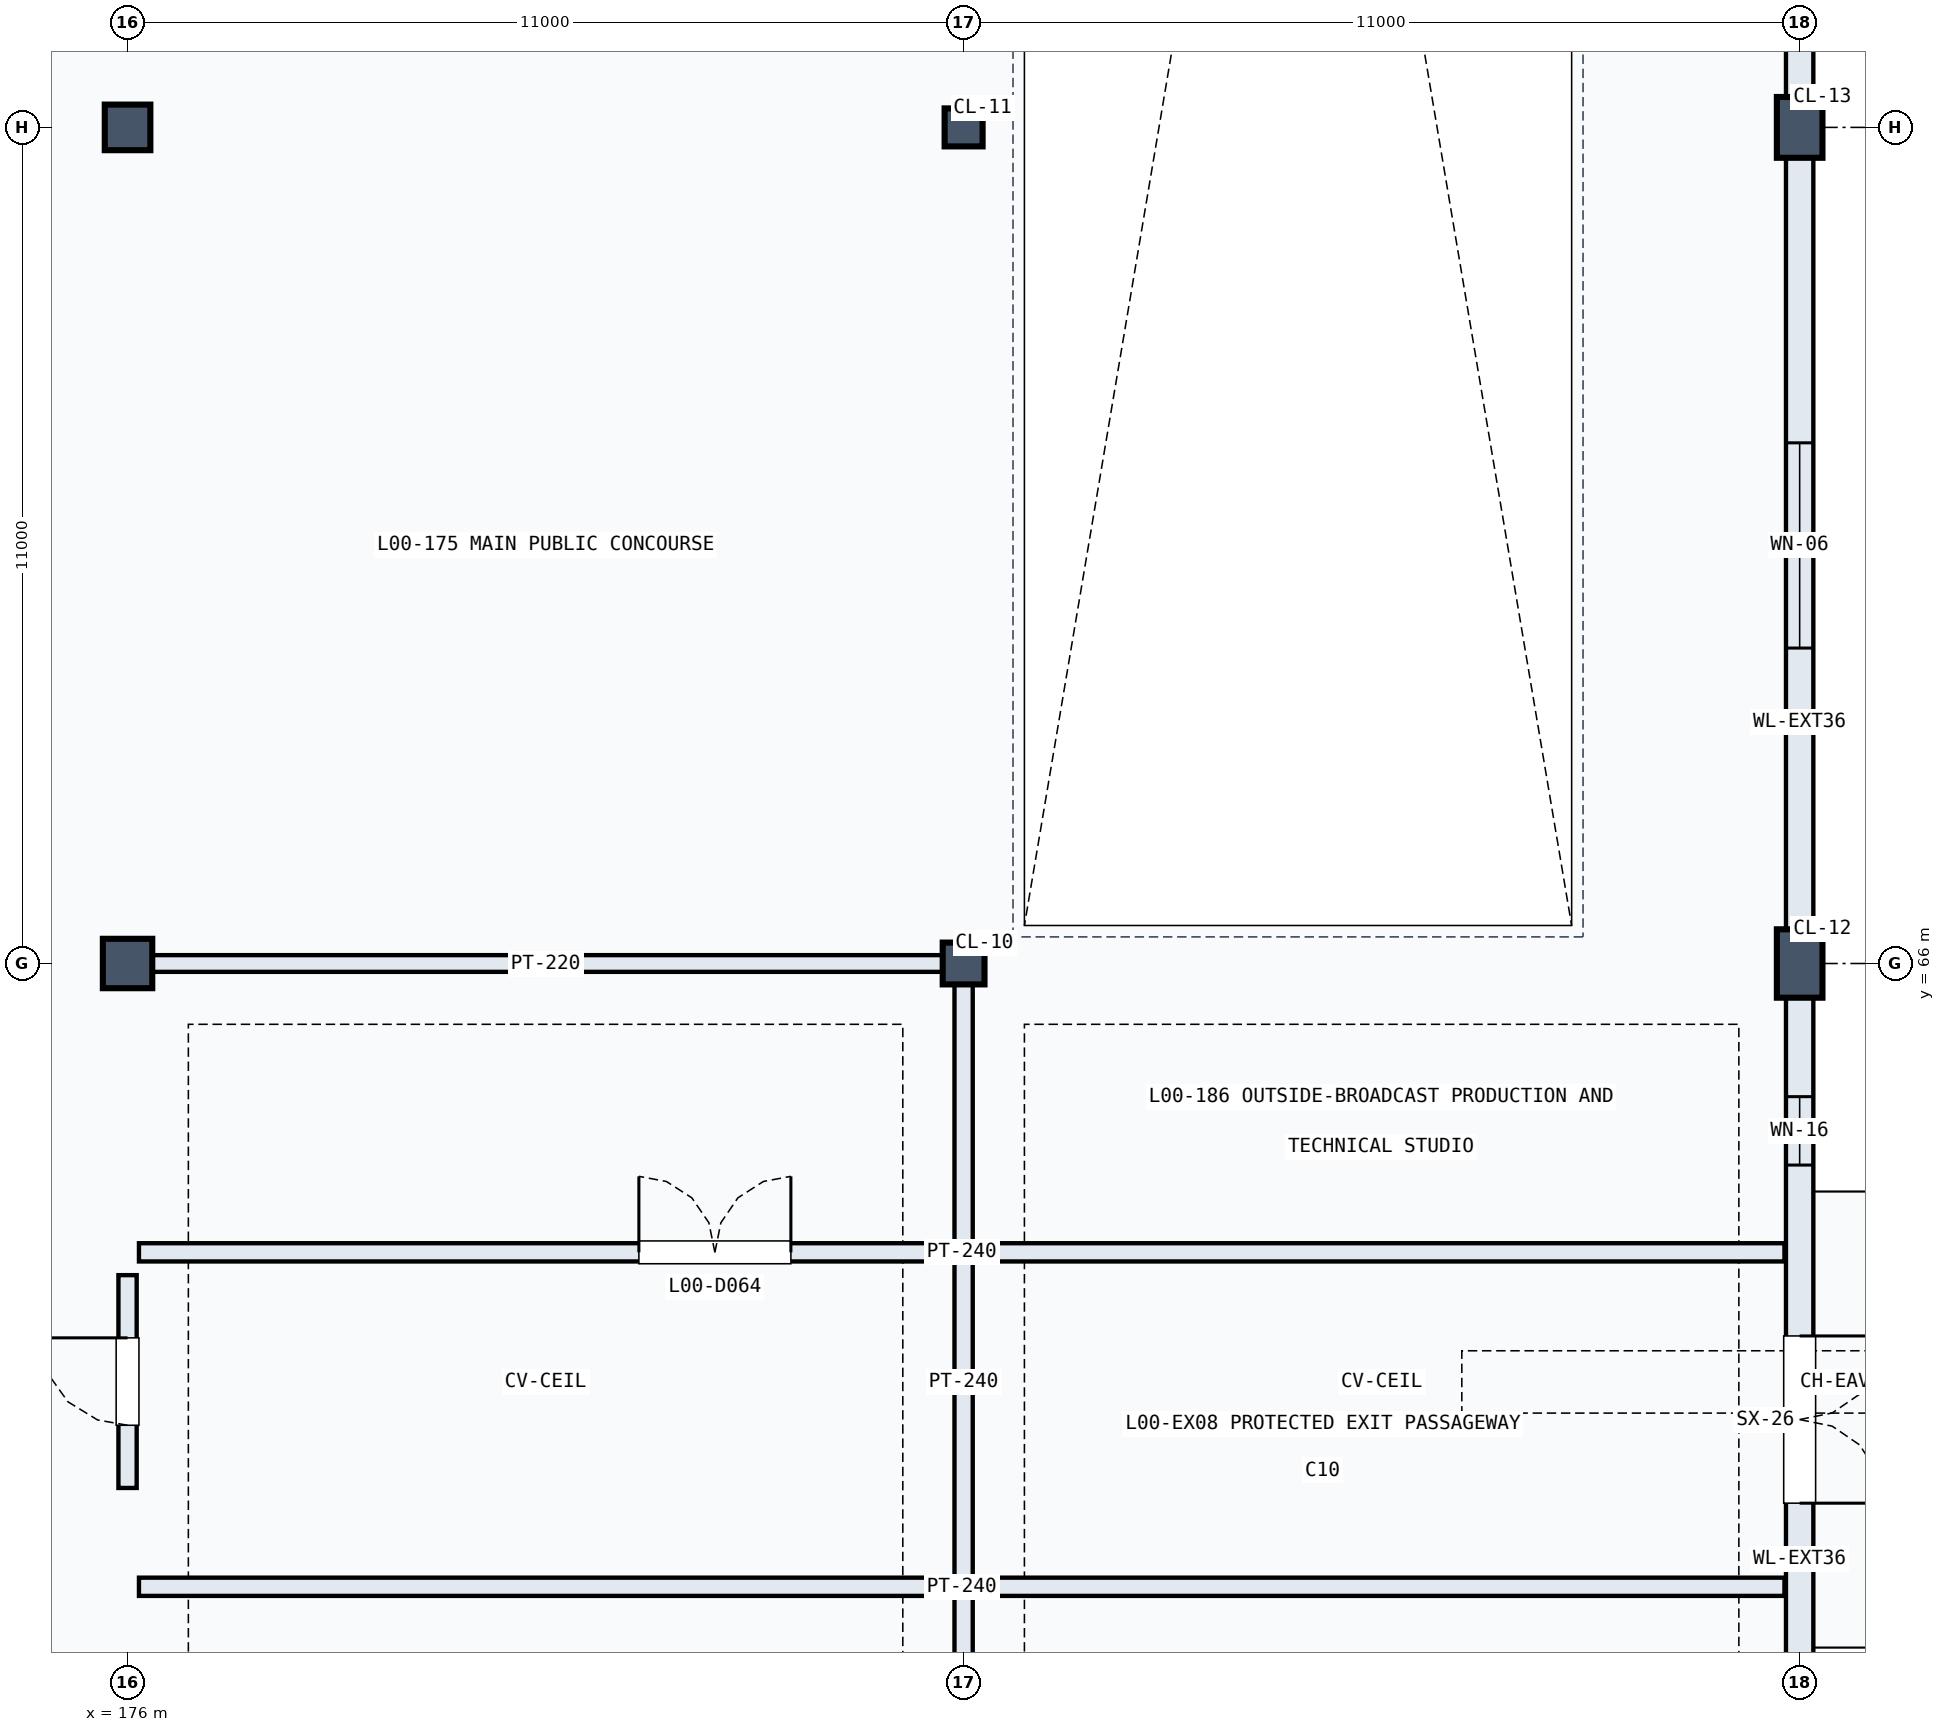
"""IFC4 building model, lengths in metres.
Left out: names, types, materials, properties, quantities, classifications, styles, units other than length and angle.
Written with IfcOpenShell. Run it as: python <this file> out.ifc"""

import sys

from ifc_helpers import new_model, si_unit, direction, frame, frame_2d, origin, origin_2d, place, context, subcontext, project, spatial, rectangle, extrude, element, fill, save


model = new_model("IFC4")
c1 = context("Model", 3, precision=1e-05, world=origin(), true_north=direction((0.0, 1.0)))
c2 = subcontext(c1, "Body", "Model", "MODEL_VIEW")
j1 = project(units=[si_unit("LENGTHUNIT", "METRE"), si_unit("PLANEANGLEUNIT", "RADIAN")], contexts=[c1])
p1 = place(None, origin())
s1 = spatial("IfcSite", under=j1, at=p1, CompositionType="ELEMENT")
p2 = place(p1, origin())
s2 = spatial("IfcBuilding", under=s1, at=p2, CompositionType="ELEMENT")
p3 = place(p2, origin())
s3 = spatial("IfcBuildingStorey", under=s2, at=p3, CompositionType="ELEMENT", Elevation=0.0)
p4 = place(p3, frame((176.0, 66.0, 0.0), z_axis=(0.0, 0.0, 1.0), x_axis=(1.0, 0.0, 0.0)))
e1 = element("IfcColumn", 1, at=p4, inside=s3, PredefinedType="COLUMN", context=c2, shape_type="SweptSolid", body=[
    extrude(rectangle(XDim=0.65, YDim=0.65, at=origin_2d()), origin(), (0.0, 0.0, 1.0), 5.4),
])
p5 = place(p3, frame((176.0, 77.0, 0.0), z_axis=(0.0, 0.0, 1.0), x_axis=(1.0, 0.0, 0.0)))
e2 = element("IfcColumn", 2, at=p5, inside=s3, PredefinedType="COLUMN", context=c2, shape_type="SweptSolid", body=[
    extrude(rectangle(XDim=0.6, YDim=0.6, at=origin_2d()), origin(), (0.0, 0.0, 1.0), 5.4),
])
p6 = place(p3, frame((187.0, 66.0, 0.0), z_axis=(0.0, 0.0, 1.0), x_axis=(1.0, 0.0, 0.0)))
e3 = element("IfcColumn", 3, at=p6, inside=s3, PredefinedType="COLUMN", context=c2, shape_type="SweptSolid", body=[
    extrude(rectangle(XDim=0.55, YDim=0.55, at=origin_2d()), origin(), (0.0, 0.0, 1.0), 5.4),
])
p7 = place(p3, frame((187.0, 77.0, 0.0), z_axis=(0.0, 0.0, 1.0), x_axis=(1.0, 0.0, 0.0)))
e4 = element("IfcColumn", 4, at=p7, inside=s3, PredefinedType="COLUMN", context=c2, shape_type="SweptSolid", body=[
    extrude(rectangle(XDim=0.5, YDim=0.5, at=origin_2d()), origin(), (0.0, 0.0, 1.0), 5.4),
])
p8 = place(p3, frame((198.0, 66.0, 0.0), z_axis=(0.0, 0.0, 1.0), x_axis=(1.0, 0.0, 0.0)))
e5 = element("IfcColumn", 5, at=p8, inside=s3, PredefinedType="COLUMN", context=c2, shape_type="SweptSolid", body=[
    extrude(rectangle(XDim=0.6, YDim=0.9, at=origin_2d()), origin(), (0.0, 0.0, 1.0), 5.4),
])
p9 = place(p3, frame((198.0, 77.0, 0.0), z_axis=(0.0, 0.0, 1.0), x_axis=(1.0, 0.0, 0.0)))
e6 = element("IfcColumn", 6, at=p9, inside=s3, PredefinedType="COLUMN", context=c2, shape_type="SweptSolid", body=[
    extrude(rectangle(XDim=0.6, YDim=0.8, at=origin_2d()), origin(), (0.0, 0.0, 1.0), 5.4),
])
p10 = place(p3, frame((198.0, 55.21, 0.0), z_axis=(0.0, 0.0, 1.0), x_axis=(0.0, 1.0, 0.0)))
e7 = element("IfcWall", 7, at=p10, inside=s3, PredefinedType="SOLIDWALL", context=c2, shape_type="SweptSolid", body=[
    extrude(rectangle(XDim=10.57, YDim=0.36, at=frame_2d((5.285, 0.0))), origin(), (0.0, 0.0, 1.0), 4.3),
])
p11 = place(p10, frame((3.69, 0.0, 0.0)))
e8 = element("IfcOpeningElement", 8, at=p11, cuts=e7, PredefinedType="OPENING", context=c2, shape_type="SweptSolid", body=[
    extrude(rectangle(XDim=2.2, YDim=2.35, at=frame_2d((1.1, 1.175))), frame((0.0, 0.19, 0.0), z_axis=(0.0, -1.0, 0.0), x_axis=(1.0, 0.0, 0.0)), (0.0, 0.0, 1.0), 0.38),
])
p12 = place(p10, frame((8.138, 0.0, 0.8)))
e9 = element("IfcOpeningElement", 9, at=p12, cuts=e7, PredefinedType="OPENING", context=c2, shape_type="SweptSolid", body=[
    extrude(rectangle(XDim=0.9, YDim=1.8, at=frame_2d((0.45, 0.9))), frame((0.0, 0.19, 0.0), z_axis=(0.0, -1.0, 0.0), x_axis=(1.0, 0.0, 0.0)), (0.0, 0.0, 1.0), 0.38),
])
p13 = place(p3, frame((198.0, 66.22, 0.0), z_axis=(0.0, 0.0, 1.0), x_axis=(0.0, 1.0, 0.0)))
e10 = element("IfcWall", 10, at=p13, inside=s3, PredefinedType="SOLIDWALL", context=c2, shape_type="SweptSolid", body=[
    extrude(rectangle(XDim=10.56, YDim=0.36, at=frame_2d((5.28, 0.0))), origin(), (0.0, 0.0, 1.0), 4.43),
])
p14 = place(p13, frame((3.93, 0.0, 0.85)))
e11 = element("IfcOpeningElement", 11, at=p14, cuts=e10, PredefinedType="OPENING", context=c2, shape_type="SweptSolid", body=[
    extrude(rectangle(XDim=2.7, YDim=1.95, at=frame_2d((1.35, 0.975))), frame((0.0, 0.19, 0.0), z_axis=(0.0, -1.0, 0.0), x_axis=(1.0, 0.0, 0.0)), (0.0, 0.0, 1.0), 0.38),
])
p15 = place(p3, frame((198.0, 77.22, 0.0), z_axis=(0.0, 0.0, 1.0), x_axis=(0.0, 1.0, 0.0)))
e12 = element("IfcWall", 12, at=p15, inside=s3, PredefinedType="SOLIDWALL", context=c2, shape_type="SweptSolid", body=[
    extrude(rectangle(XDim=10.56, YDim=0.36, at=frame_2d((5.28, 0.0))), origin(), (0.0, 0.0, 1.0), 4.43),
])
p16 = place(p15, frame((3.78, 0.0, 0.9)))
e13 = element("IfcOpeningElement", 13, at=p16, cuts=e12, PredefinedType="OPENING", context=c2, shape_type="SweptSolid", body=[
    extrude(rectangle(XDim=3.0, YDim=1.8, at=frame_2d((1.5, 0.9))), frame((0.0, 0.19, 0.0), z_axis=(0.0, -1.0, 0.0), x_axis=(1.0, 0.0, 0.0)), (0.0, 0.0, 1.0), 0.38),
])
p17 = place(p3, frame((176.22, 66.0, 0.0), z_axis=(0.0, 0.0, 1.0), x_axis=(1.0, 0.0, 0.0)))
e14 = element("IfcWall", 14, at=p17, inside=s3, PredefinedType="PARTITIONING", context=c2, shape_type="SweptSolid", body=[
    extrude(rectangle(XDim=10.56, YDim=0.22, at=frame_2d((5.28, 0.0))), origin(), (0.0, 0.0, 1.0), 4.3),
])
p18 = place(p3, frame((187.0, 55.22, 0.0), z_axis=(0.0, 0.0, 1.0), x_axis=(0.0, 1.0, 0.0)))
e15 = element("IfcWall", 15, at=p18, inside=s3, PredefinedType="PARTITIONING", context=c2, shape_type="SweptSolid", body=[
    extrude(rectangle(XDim=10.56, YDim=0.24, at=frame_2d((5.28, 0.0))), origin(), (0.0, 0.0, 1.0), 4.25),
])
p19 = place(p3, frame((176.15, 57.8, 0.0), z_axis=(0.0, 0.0, 1.0), x_axis=(1.0, 0.0, 0.0)))
e16 = element("IfcWall", 16, at=p19, inside=s3, PredefinedType="PARTITIONING", context=c2, shape_type="SweptSolid", body=[
    extrude(rectangle(XDim=21.65, YDim=0.24, at=frame_2d((10.825, 0.0))), origin(), (0.0, 0.0, 1.0), 4.3),
])
p20 = place(p3, frame((176.15, 62.2, 0.0), z_axis=(0.0, 0.0, 1.0), x_axis=(1.0, 0.0, 0.0)))
e17 = element("IfcWall", 17, at=p20, inside=s3, PredefinedType="PARTITIONING", context=c2, shape_type="SweptSolid", body=[
    extrude(rectangle(XDim=21.65, YDim=0.24, at=frame_2d((10.825, 0.0))), origin(), (0.0, 0.0, 1.0), 4.3),
])
p21 = place(p20, frame((6.577, 0.0, 0.0)))
e18 = element("IfcOpeningElement", 18, at=p21, cuts=e17, PredefinedType="OPENING", context=c2, shape_type="SweptSolid", body=[
    extrude(rectangle(XDim=2.0, YDim=2.25, at=frame_2d((1.0, 1.125))), frame((0.0, 0.13, 0.0), z_axis=(0.0, -1.0, 0.0), x_axis=(1.0, 0.0, 0.0)), (0.0, 0.0, 1.0), 0.26),
])
p22 = place(p3, frame((176.0, 59.1, 0.0), z_axis=(0.0, 0.0, 1.0), x_axis=(0.0, 1.0, 0.0)))
e19 = element("IfcWall", 19, at=p22, inside=s3, PredefinedType="PARTITIONING", context=c2, shape_type="SweptSolid", body=[
    extrude(rectangle(XDim=2.8, YDim=0.24, at=frame_2d((1.4, 0.0))), origin(), (0.0, 0.0, 1.0), 4.3),
])
p23 = place(p22, frame((0.825, 0.0, 0.0)))
e20 = element("IfcOpeningElement", 20, at=p23, cuts=e19, PredefinedType="OPENING", context=c2, shape_type="SweptSolid", body=[
    extrude(rectangle(XDim=1.15, YDim=2.2, at=frame_2d((0.575, 1.1))), frame((0.0, 0.13, 0.0), z_axis=(0.0, -1.0, 0.0), x_axis=(1.0, 0.0, 0.0)), (0.0, 0.0, 1.0), 0.26),
])
p24 = place(p11, frame((2.2, 0.0, 0.0), z_axis=(0.0, 0.0, 1.0), x_axis=(-1.0, 0.0, 0.0)))
e21 = element("IfcDoor", 21, at=p24, inside=s3, OperationType="DOUBLE_DOOR_SINGLE_SWING", PredefinedType="DOOR", context=c2, shape_type="SweptSolid", body=[
    extrude(rectangle(XDim=2.2, YDim=2.35, at=frame_2d((1.1, 1.175))), frame((0.0, 0.025, 0.0), z_axis=(0.0, -1.0, 0.0), x_axis=(1.0, 0.0, 0.0)), (0.0, 0.0, 1.0), 0.05),
])
fill(e8, e21)
p25 = place(p12, origin())
e22 = element("IfcWindow", 22, at=p25, inside=s3, PartitioningType="SINGLE_PANEL", PredefinedType="WINDOW", context=c2, shape_type="SweptSolid", body=[
    extrude(rectangle(XDim=0.9, YDim=1.8, at=frame_2d((0.45, 0.9))), frame((0.0, 0.03, 0.0), z_axis=(0.0, -1.0, 0.0), x_axis=(1.0, 0.0, 0.0)), (0.0, 0.0, 1.0), 0.06),
])
fill(e9, e22)
p26 = place(p14, origin())
e23 = element("IfcWindow", 23, at=p26, inside=s3, PartitioningType="SINGLE_PANEL", PredefinedType="WINDOW", context=c2, shape_type="SweptSolid", body=[
    extrude(rectangle(XDim=2.7, YDim=1.95, at=frame_2d((1.35, 0.975))), frame((0.0, 0.03, 0.0), z_axis=(0.0, -1.0, 0.0), x_axis=(1.0, 0.0, 0.0)), (0.0, 0.0, 1.0), 0.06),
])
fill(e11, e23)
p27 = place(p21, origin())
e24 = element("IfcDoor", 24, at=p27, inside=s3, OperationType="DOUBLE_DOOR_SINGLE_SWING", PredefinedType="DOOR", context=c2, shape_type="SweptSolid", body=[
    extrude(rectangle(XDim=2.0, YDim=2.25, at=frame_2d((1.0, 1.125))), frame((0.0, 0.025, 0.0), z_axis=(0.0, -1.0, 0.0), x_axis=(1.0, 0.0, 0.0)), (0.0, 0.0, 1.0), 0.05),
])
fill(e18, e24)
p28 = place(p23, origin())
e25 = element("IfcDoor", 25, at=p28, inside=s3, OperationType="SINGLE_SWING_RIGHT", PredefinedType="DOOR", context=c2, shape_type="SweptSolid", body=[
    extrude(rectangle(XDim=1.15, YDim=2.2, at=frame_2d((0.575, 1.1))), frame((0.0, 0.025, 0.0), z_axis=(0.0, -1.0, 0.0), x_axis=(1.0, 0.0, 0.0)), (0.0, 0.0, 1.0), 0.05),
])
fill(e20, e25)
save(model, sys.argv[1])
